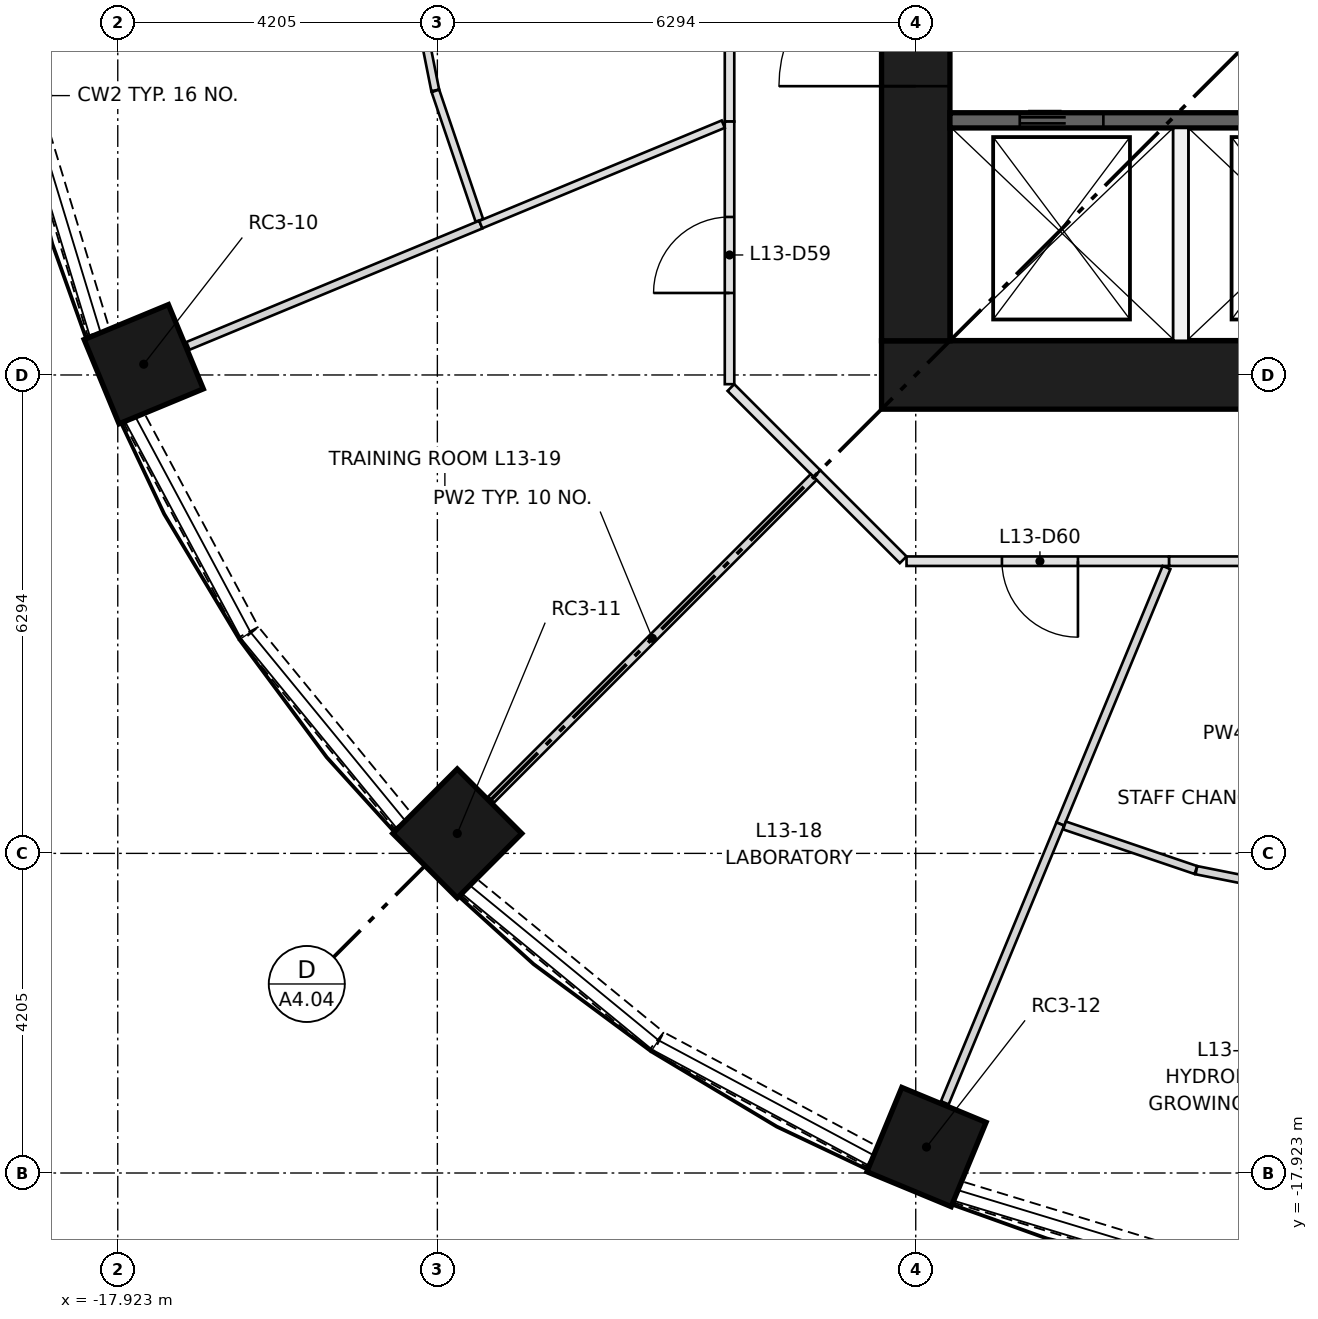
"""IFC4 building model, lengths in metres.
Left out: names, types, materials, properties, quantities, classifications, styles, units other than length and angle.
Written with IfcOpenShell. Run it as: python <this file> out.ifc"""

import sys

from ifc_helpers import new_model, si_unit, direction, frame, frame_2d, origin, origin_2d, place, context, subcontext, project, spatial, rectangle, extrude, element, fill, save


model = new_model("IFC4")
c1 = context("Model", 3, precision=1e-05, world=origin(), true_north=direction((0.0, 1.0)))
c2 = subcontext(c1, "Body", "Model", "MODEL_VIEW")
j1 = project(units=[si_unit("LENGTHUNIT", "METRE"), si_unit("PLANEANGLEUNIT", "RADIAN")], contexts=[c1])
p1 = place(None, origin())
s1 = spatial("IfcSite", under=j1, at=p1, CompositionType="ELEMENT")
p2 = place(p1, origin())
s2 = spatial("IfcBuilding", under=s1, at=p2, CompositionType="ELEMENT")
p3 = place(p2, frame((0.0, 0.0, 51.75)))
s3 = spatial("IfcBuildingStorey", under=s2, at=p3, CompositionType="ELEMENT", Elevation=51.75)
for number, where, z_axis, x_axis in (
    (1, (-17.582, -7.282, 0.0), (0.0, 0.0, 1.0), (-0.924, -0.383, 0.0)),
    (2, (-13.456, -13.456, 0.0), (0.0, 0.0, 1.0), (-0.707, -0.707, 0.0)),
    (3, (-7.282, -17.582, 0.0), (0.0, 0.0, 1.0), (-0.383, -0.924, 0.0)),
):
    element("IfcColumn", number, at=place(p3, frame(where, z_axis=z_axis, x_axis=x_axis)), inside=s3, PredefinedType="COLUMN", context=c2, shape_type="SweptSolid", body=[
        extrude(rectangle(XDim=1.2, YDim=1.2, at=origin_2d()), origin(), (0.0, 0.0, 1.0), 3.65),
    ])
p4 = place(p3, frame((-7.874, -7.424, 0.0), z_axis=(0.0, 0.0, 1.0), x_axis=(1.0, 0.0, 0.0)))
e4 = element("IfcWall", 4, at=p4, inside=s3, PredefinedType="SHEAR", context=c2, shape_type="SweptSolid", body=[
    extrude(rectangle(XDim=15.748, YDim=0.9, at=frame_2d((7.874, 0.0))), origin(), (0.0, 0.0, 1.0), 3.65),
])
p5 = place(p3, frame((-7.424, -6.974, 0.0), z_axis=(0.0, 0.0, 1.0), x_axis=(0.0, 1.0, 0.0)))
e5 = element("IfcWall", 5, at=p5, inside=s3, PredefinedType="SHEAR", context=c2, shape_type="SweptSolid", body=[
    extrude(rectangle(XDim=13.948, YDim=0.9, at=frame_2d((6.974, 0.0))), origin(), (0.0, 0.0, 1.0), 3.65),
])
p6 = place(p5, frame((6.474, 0.0, 0.0)))
e6 = element("IfcOpeningElement", 6, at=p6, cuts=e5, PredefinedType="OPENING", context=c2, shape_type="SweptSolid", body=[
    extrude(rectangle(XDim=1.0, YDim=2.1, at=frame_2d((0.5, 1.05))), frame((0.0, 0.46, 0.0), z_axis=(0.0, -1.0, 0.0), x_axis=(1.0, 0.0, 0.0)), (0.0, 0.0, 1.0), 0.92),
])
p7 = place(p5, frame((3.35, 0.0, 0.0)))
e7 = element("IfcOpeningElement", 7, at=p7, cuts=e5, PredefinedType="OPENING", context=c2, shape_type="SweptSolid", body=[
    extrude(rectangle(XDim=1.8, YDim=2.1, at=frame_2d((0.9, 1.05))), frame((0.0, 0.46, 0.0), z_axis=(0.0, -1.0, 0.0), x_axis=(1.0, 0.0, 0.0)), (0.0, 0.0, 1.0), 0.92),
])
p8 = place(p5, frame((8.799, 0.0, 0.0)))
e8 = element("IfcOpeningElement", 8, at=p8, cuts=e5, PredefinedType="OPENING", context=c2, shape_type="SweptSolid", body=[
    extrude(rectangle(XDim=1.8, YDim=2.1, at=frame_2d((0.9, 1.05))), frame((0.0, 0.46, 0.0), z_axis=(0.0, -1.0, 0.0), x_axis=(1.0, 0.0, 0.0)), (0.0, 0.0, 1.0), 0.92),
])
p9 = place(p5, frame((11.974, 0.0, 0.0)))
e9 = element("IfcOpeningElement", 9, at=p9, cuts=e5, PredefinedType="OPENING", context=c2, shape_type="SweptSolid", body=[
    extrude(rectangle(XDim=1.0, YDim=2.1, at=frame_2d((0.5, 1.05))), frame((0.0, 0.46, 0.0), z_axis=(0.0, -1.0, 0.0), x_axis=(1.0, 0.0, 0.0)), (0.0, 0.0, 1.0), 0.92),
])
p10 = place(p3, frame((-6.974, -4.074, 0.0), z_axis=(0.0, 0.0, 1.0), x_axis=(1.0, 0.0, 0.0)))
e10 = element("IfcWall", 10, at=p10, inside=s3, PredefinedType="SHEAR", context=c2, shape_type="SweptSolid", body=[
    extrude(rectangle(XDim=13.948, YDim=0.2, at=frame_2d((6.974, 0.0))), origin(), (0.0, 0.0, 1.0), 3.3),
])
p11 = place(p10, frame((0.918, 0.0, 0.0)))
e11 = element("IfcOpeningElement", 11, at=p11, cuts=e10, PredefinedType="OPENING", context=c2, shape_type="SweptSolid", body=[
    extrude(rectangle(XDim=1.1, YDim=2.1, at=frame_2d((0.55, 1.05))), frame((0.0, 0.11, 0.0), z_axis=(0.0, -1.0, 0.0), x_axis=(1.0, 0.0, 0.0)), (0.0, 0.0, 1.0), 0.22),
])
p12 = place(p10, frame((4.055, 0.0, 0.0)))
e12 = element("IfcOpeningElement", 12, at=p12, cuts=e10, PredefinedType="OPENING", context=c2, shape_type="SweptSolid", body=[
    extrude(rectangle(XDim=1.1, YDim=2.1, at=frame_2d((0.55, 1.05))), frame((0.0, 0.11, 0.0), z_axis=(0.0, -1.0, 0.0), x_axis=(1.0, 0.0, 0.0)), (0.0, 0.0, 1.0), 0.22),
])
p13 = place(p10, frame((6.658, 0.0, 0.0)))
e13 = element("IfcOpeningElement", 13, at=p13, cuts=e10, PredefinedType="OPENING", context=c2, shape_type="SweptSolid", body=[
    extrude(rectangle(XDim=1.0, YDim=2.1, at=frame_2d((0.5, 1.05))), frame((0.0, 0.11, 0.0), z_axis=(0.0, -1.0, 0.0), x_axis=(1.0, 0.0, 0.0)), (0.0, 0.0, 1.0), 0.22),
])
p14 = place(p10, frame((8.627, 0.0, 0.0)))
e14 = element("IfcOpeningElement", 14, at=p14, cuts=e10, PredefinedType="OPENING", context=c2, shape_type="SweptSolid", body=[
    extrude(rectangle(XDim=1.0, YDim=2.1, at=frame_2d((0.5, 1.05))), frame((0.0, 0.11, 0.0), z_axis=(0.0, -1.0, 0.0), x_axis=(1.0, 0.0, 0.0)), (0.0, 0.0, 1.0), 0.22),
])
p15 = place(p10, frame((10.595, 0.0, 0.0)))
e15 = element("IfcOpeningElement", 15, at=p15, cuts=e10, PredefinedType="OPENING", context=c2, shape_type="SweptSolid", body=[
    extrude(rectangle(XDim=1.0, YDim=2.1, at=frame_2d((0.5, 1.05))), frame((0.0, 0.11, 0.0), z_axis=(0.0, -1.0, 0.0), x_axis=(1.0, 0.0, 0.0)), (0.0, 0.0, 1.0), 0.22),
])
p16 = place(p10, frame((12.564, 0.0, 0.0)))
e16 = element("IfcOpeningElement", 16, at=p16, cuts=e10, PredefinedType="OPENING", context=c2, shape_type="SweptSolid", body=[
    extrude(rectangle(XDim=1.0, YDim=2.1, at=frame_2d((0.5, 1.05))), frame((0.0, 0.11, 0.0), z_axis=(0.0, -1.0, 0.0), x_axis=(1.0, 0.0, 0.0)), (0.0, 0.0, 1.0), 0.22),
])
p17 = place(p3, frame((-3.937, -6.974, 0.0), z_axis=(0.0, 0.0, 1.0), x_axis=(0.0, 1.0, 0.0)))
e17 = element("IfcWall", 17, at=p17, inside=s3, PredefinedType="PARTITIONING", context=c2, shape_type="SweptSolid", body=[
    extrude(rectangle(XDim=2.8, YDim=0.2, at=frame_2d((1.4, 0.0))), origin(), (0.0, 0.0, 1.0), 3.3),
])
p18 = place(p3, frame((-19.102, -3.814, 0.0), z_axis=(0.0, 0.0, 1.0), x_axis=(0.290585541792, -0.956849017819, 0.0)))
e18 = element("IfcWall", 18, at=p18, inside=s3, PredefinedType="SOLIDWALL", context=c2, shape_type="SweptSolid", body=[
    extrude(rectangle(XDim=3.188, YDim=0.3, at=frame_2d((1.594, 0.0))), origin(), (0.0, 0.0, 1.0), 0.9),
])
p19 = place(p3, frame((-17.706, -7.998, 0.0), z_axis=(0.0, 0.0, 1.0), x_axis=(0.471260138764, -0.881994263934, 0.0)))
e19 = element("IfcWall", 19, at=p19, inside=s3, PredefinedType="SOLIDWALL", context=c2, shape_type="SweptSolid", body=[
    extrude(rectangle(XDim=3.187, YDim=0.3, at=frame_2d((1.593, 0.0))), origin(), (0.0, 0.0, 1.0), 0.9),
])
for number, where, z_axis, x_axis in (
    (20, (-16.188, -10.833, 0.0), (0.0, 0.0, 1.0), (0.634, -0.773, 0.0)),
    (21, (-13.298, -14.166, 0.0), (0.0, 0.0, 1.0), (0.773, -0.634, 0.0)),
):
    element("IfcWall", number, at=place(p3, frame(where, z_axis=z_axis, x_axis=x_axis)), inside=s3, PredefinedType="SOLIDWALL", context=c2, shape_type="SweptSolid", body=[
        extrude(rectangle(XDim=3.188, YDim=0.3, at=frame_2d((1.594, 0.0))), origin(), (0.0, 0.0, 1.0), 0.9),
    ])
p20 = place(p3, frame((-10.809, -16.204, 0.0), z_axis=(0.0, 0.0, 1.0), x_axis=(0.881994263934, -0.471260138764, 0.0)))
e22 = element("IfcWall", 22, at=p20, inside=s3, PredefinedType="SOLIDWALL", context=c2, shape_type="SweptSolid", body=[
    extrude(rectangle(XDim=3.187, YDim=0.3, at=frame_2d((1.593, 0.0))), origin(), (0.0, 0.0, 1.0), 0.9),
])
p21 = place(p3, frame((-6.865, -18.175, 0.0), z_axis=(0.0, 0.0, 1.0), x_axis=(0.956849017819, -0.290585541792, 0.0)))
e23 = element("IfcWall", 23, at=p21, inside=s3, PredefinedType="SOLIDWALL", context=c2, shape_type="SweptSolid", body=[
    extrude(rectangle(XDim=3.188, YDim=0.3, at=frame_2d((1.594, 0.0))), origin(), (0.0, 0.0, 1.0), 0.9),
])
p22 = place(p3, frame((-9.874, -4.09, 0.0), z_axis=(0.0, 0.0, 1.0), x_axis=(0.0, 1.0, 0.0)))
e24 = element("IfcWall", 24, at=p22, inside=s3, PredefinedType="PARTITIONING", context=c2, shape_type="SweptSolid", body=[
    extrude(rectangle(XDim=4.09, YDim=0.125, at=frame_2d((2.045, 0.0))), origin(), (0.0, 0.0, 1.0), 3.3),
])
p23 = place(p22, frame((1.5, 0.0, 0.0)))
e25 = element("IfcOpeningElement", 25, at=p23, cuts=e24, PredefinedType="OPENING", context=c2, shape_type="SweptSolid", body=[
    extrude(rectangle(XDim=1.0, YDim=2.1, at=frame_2d((0.5, 1.05))), frame((0.0, 0.073, 0.0), z_axis=(0.0, -1.0, 0.0), x_axis=(1.0, 0.0, 0.0)), (0.0, 0.0, 1.0), 0.145),
])
p24 = place(p3, frame((-9.874, -7.545, 0.0), z_axis=(0.0, 0.0, 1.0), x_axis=(0.0, 1.0, 0.0)))
e26 = element("IfcWall", 26, at=p24, inside=s3, PredefinedType="PARTITIONING", context=c2, shape_type="SweptSolid", body=[
    extrude(rectangle(XDim=3.455, YDim=0.125, at=frame_2d((1.728, 0.0))), origin(), (0.0, 0.0, 1.0), 3.3),
])
p25 = place(p24, frame((1.2, 0.0, 0.0)))
e27 = element("IfcOpeningElement", 27, at=p25, cuts=e26, PredefinedType="OPENING", context=c2, shape_type="SweptSolid", body=[
    extrude(rectangle(XDim=1.0, YDim=2.1, at=frame_2d((0.5, 1.05))), frame((0.0, 0.073, 0.0), z_axis=(0.0, -1.0, 0.0), x_axis=(1.0, 0.0, 0.0)), (0.0, 0.0, 1.0), 0.145),
])
for number, where, z_axis, x_axis in (
    (28, (-8.722, -8.722, 0.0), (0.0, 0.0, 1.0), (-0.707, 0.707, 0.0)),
    (29, (-7.589, -9.856, 0.0), (0.0, 0.0, 1.0), (-0.707, 0.707, 0.0)),
):
    element("IfcWall", number, at=place(p3, frame(where, z_axis=z_axis, x_axis=x_axis)), inside=s3, PredefinedType="PARTITIONING", context=c2, shape_type="SweptSolid", body=[
        extrude(rectangle(XDim=1.603, YDim=0.125, at=frame_2d((0.801, 0.0))), origin(), (0.0, 0.0, 1.0), 3.3),
    ])
p26 = place(p3, frame((-4.09, -9.874, 0.0), z_axis=(0.0, 0.0, 1.0), x_axis=(-1.0, 0.0, 0.0)))
e30 = element("IfcWall", 30, at=p26, inside=s3, PredefinedType="PARTITIONING", context=c2, shape_type="SweptSolid", body=[
    extrude(rectangle(XDim=3.455, YDim=0.125, at=frame_2d((1.728, 0.0))), origin(), (0.0, 0.0, 1.0), 3.3),
])
p27 = place(p26, frame((1.2, 0.0, 0.0)))
e31 = element("IfcOpeningElement", 31, at=p27, cuts=e30, PredefinedType="OPENING", context=c2, shape_type="SweptSolid", body=[
    extrude(rectangle(XDim=1.0, YDim=2.1, at=frame_2d((0.5, 1.05))), frame((0.0, 0.073, 0.0), z_axis=(0.0, -1.0, 0.0), x_axis=(1.0, 0.0, 0.0)), (0.0, 0.0, 1.0), 0.145),
])
p28 = place(p3, frame((0.062, -9.874, 0.0), z_axis=(0.0, 0.0, 1.0), x_axis=(-1.0, 0.0, 0.0)))
e32 = element("IfcWall", 32, at=p28, inside=s3, PredefinedType="PARTITIONING", context=c2, shape_type="SweptSolid", body=[
    extrude(rectangle(XDim=4.152, YDim=0.125, at=frame_2d((2.076, 0.0))), origin(), (0.0, 0.0, 1.0), 3.3),
])
p29 = place(p3, frame((-14.108, -1.861, 0.0), z_axis=(0.0, 0.0, 1.0), x_axis=(0.195103348377, -0.980782689209, 0.0)))
e33 = element("IfcWall", 33, at=p29, inside=s3, PredefinedType="PARTITIONING", context=c2, shape_type="SweptSolid", body=[
    extrude(rectangle(XDim=1.854, YDim=0.105, at=frame_2d((0.927, 0.0))), origin(), (0.0, 0.0, 1.0), 3.3),
])
p30 = place(p3, frame((-13.744, -3.686, 0.0), z_axis=(0.0, 0.0, 1.0), x_axis=(0.321433227273, -0.946932246998, 0.0)))
e34 = element("IfcWall", 34, at=p30, inside=s3, PredefinedType="PARTITIONING", context=c2, shape_type="SweptSolid", body=[
    extrude(rectangle(XDim=1.799, YDim=0.105, at=frame_2d((0.9, 0.0))), origin(), (0.0, 0.0, 1.0), 3.3),
])
p31 = place(p3, frame((-13.147, -5.446, 0.0), z_axis=(0.0, 0.0, 1.0), x_axis=(-0.923873410436, -0.382698212028, 0.0)))
e35 = element("IfcWall", 35, at=p31, inside=s3, PredefinedType="PARTITIONING", context=c2, shape_type="SweptSolid", body=[
    extrude(rectangle(XDim=4.17, YDim=0.11, at=frame_2d((2.085, 0.0))), origin(), (0.0, 0.0, 1.0), 3.3),
])
p32 = place(p3, frame((-9.957, -4.124, 0.0), z_axis=(0.0, 0.0, 1.0), x_axis=(-0.923867748948, -0.382711879165, 0.0)))
e36 = element("IfcWall", 36, at=p32, inside=s3, PredefinedType="PARTITIONING", context=c2, shape_type="SweptSolid", body=[
    extrude(rectangle(XDim=3.453, YDim=0.105, at=frame_2d((1.727, 0.0))), origin(), (0.0, 0.0, 1.0), 3.3),
])
p33 = place(p3, frame((-13.011, -13.011, 0.0), z_axis=(0.0, 0.0, 1.0), x_axis=(0.707106781187, 0.707106781187, 0.0)))
e37 = element("IfcWall", 37, at=p33, inside=s3, PredefinedType="PARTITIONING", context=c2, shape_type="SweptSolid", body=[
    extrude(rectangle(XDim=6.002, YDim=0.11, at=frame_2d((3.001, 0.0))), origin(), (0.0, 0.0, 1.0), 3.3),
])
p34 = place(p3, frame((-4.125, -9.958, 0.0), z_axis=(0.0, 0.0, 1.0), x_axis=(-0.382715874613, -0.923866093825, 0.0)))
e38 = element("IfcWall", 38, at=p34, inside=s3, PredefinedType="PARTITIONING", context=c2, shape_type="SweptSolid", body=[
    extrude(rectangle(XDim=3.652, YDim=0.11, at=frame_2d((1.826, 0.0))), origin(), (0.0, 0.0, 1.0), 3.3),
])
p35 = place(p3, frame((-5.522, -13.332, 0.0), z_axis=(0.0, 0.0, 1.0), x_axis=(-0.382675844596, -0.923882675432, 0.0)))
e39 = element("IfcWall", 39, at=p35, inside=s3, PredefinedType="PARTITIONING", context=c2, shape_type="SweptSolid", body=[
    extrude(rectangle(XDim=3.97, YDim=0.11, at=frame_2d((1.985, 0.0))), origin(), (0.0, 0.0, 1.0), 3.3),
])
p36 = place(p3, frame((-3.738, -13.937, 0.0), z_axis=(0.0, 0.0, 1.0), x_axis=(-0.94697070508, 0.321319908688, 0.0)))
e40 = element("IfcWall", 40, at=p36, inside=s3, PredefinedType="PARTITIONING", context=c2, shape_type="SweptSolid", body=[
    extrude(rectangle(XDim=1.825, YDim=0.11, at=frame_2d((0.913, 0.0))), origin(), (0.0, 0.0, 1.0), 3.3),
])
p37 = place(p3, frame((-1.887, -14.306, 0.0), z_axis=(0.0, 0.0, 1.0), x_axis=(-0.980774944963, 0.195142274593, 0.0)))
e41 = element("IfcWall", 41, at=p37, inside=s3, PredefinedType="PARTITIONING", context=c2, shape_type="SweptSolid", body=[
    extrude(rectangle(XDim=1.88, YDim=0.11, at=frame_2d((0.94, 0.0))), origin(), (0.0, 0.0, 1.0), 3.3),
])
p38 = place(p11, origin())
e42 = element("IfcDoor", 42, at=p38, inside=s3, OperationType="DOUBLE_DOOR_SLIDING", PredefinedType="DOOR", context=c2, shape_type="SweptSolid", body=[
    extrude(rectangle(XDim=1.1, YDim=2.1, at=frame_2d((0.55, 1.05))), frame((0.0, 0.025, 0.0), z_axis=(0.0, -1.0, 0.0), x_axis=(1.0, 0.0, 0.0)), (0.0, 0.0, 1.0), 0.05),
])
fill(e11, e42)
p39 = place(p7, origin())
e43 = element("IfcDoor", 43, at=p39, inside=s3, OperationType="DOUBLE_DOOR_SINGLE_SWING", PredefinedType="DOOR", context=c2, shape_type="SweptSolid", body=[
    extrude(rectangle(XDim=1.8, YDim=2.1, at=frame_2d((0.9, 1.05))), frame((0.0, 0.025, 0.0), z_axis=(0.0, -1.0, 0.0), x_axis=(1.0, 0.0, 0.0)), (0.0, 0.0, 1.0), 0.05),
])
fill(e7, e43)
p40 = place(p25, origin())
e44 = element("IfcDoor", 44, at=p40, inside=s3, OperationType="SINGLE_SWING_LEFT", PredefinedType="DOOR", context=c2, shape_type="SweptSolid", body=[
    extrude(rectangle(XDim=1.0, YDim=2.1, at=frame_2d((0.5, 1.05))), frame((0.0, 0.025, 0.0), z_axis=(0.0, -1.0, 0.0), x_axis=(1.0, 0.0, 0.0)), (0.0, 0.0, 1.0), 0.05),
])
fill(e27, e44)
p41 = place(p27, origin())
e45 = element("IfcDoor", 45, at=p41, inside=s3, OperationType="SINGLE_SWING_LEFT", PredefinedType="DOOR", context=c2, shape_type="SweptSolid", body=[
    extrude(rectangle(XDim=1.0, YDim=2.1, at=frame_2d((0.5, 1.05))), frame((0.0, 0.025, 0.0), z_axis=(0.0, -1.0, 0.0), x_axis=(1.0, 0.0, 0.0)), (0.0, 0.0, 1.0), 0.05),
])
fill(e31, e45)
save(model, sys.argv[1])
